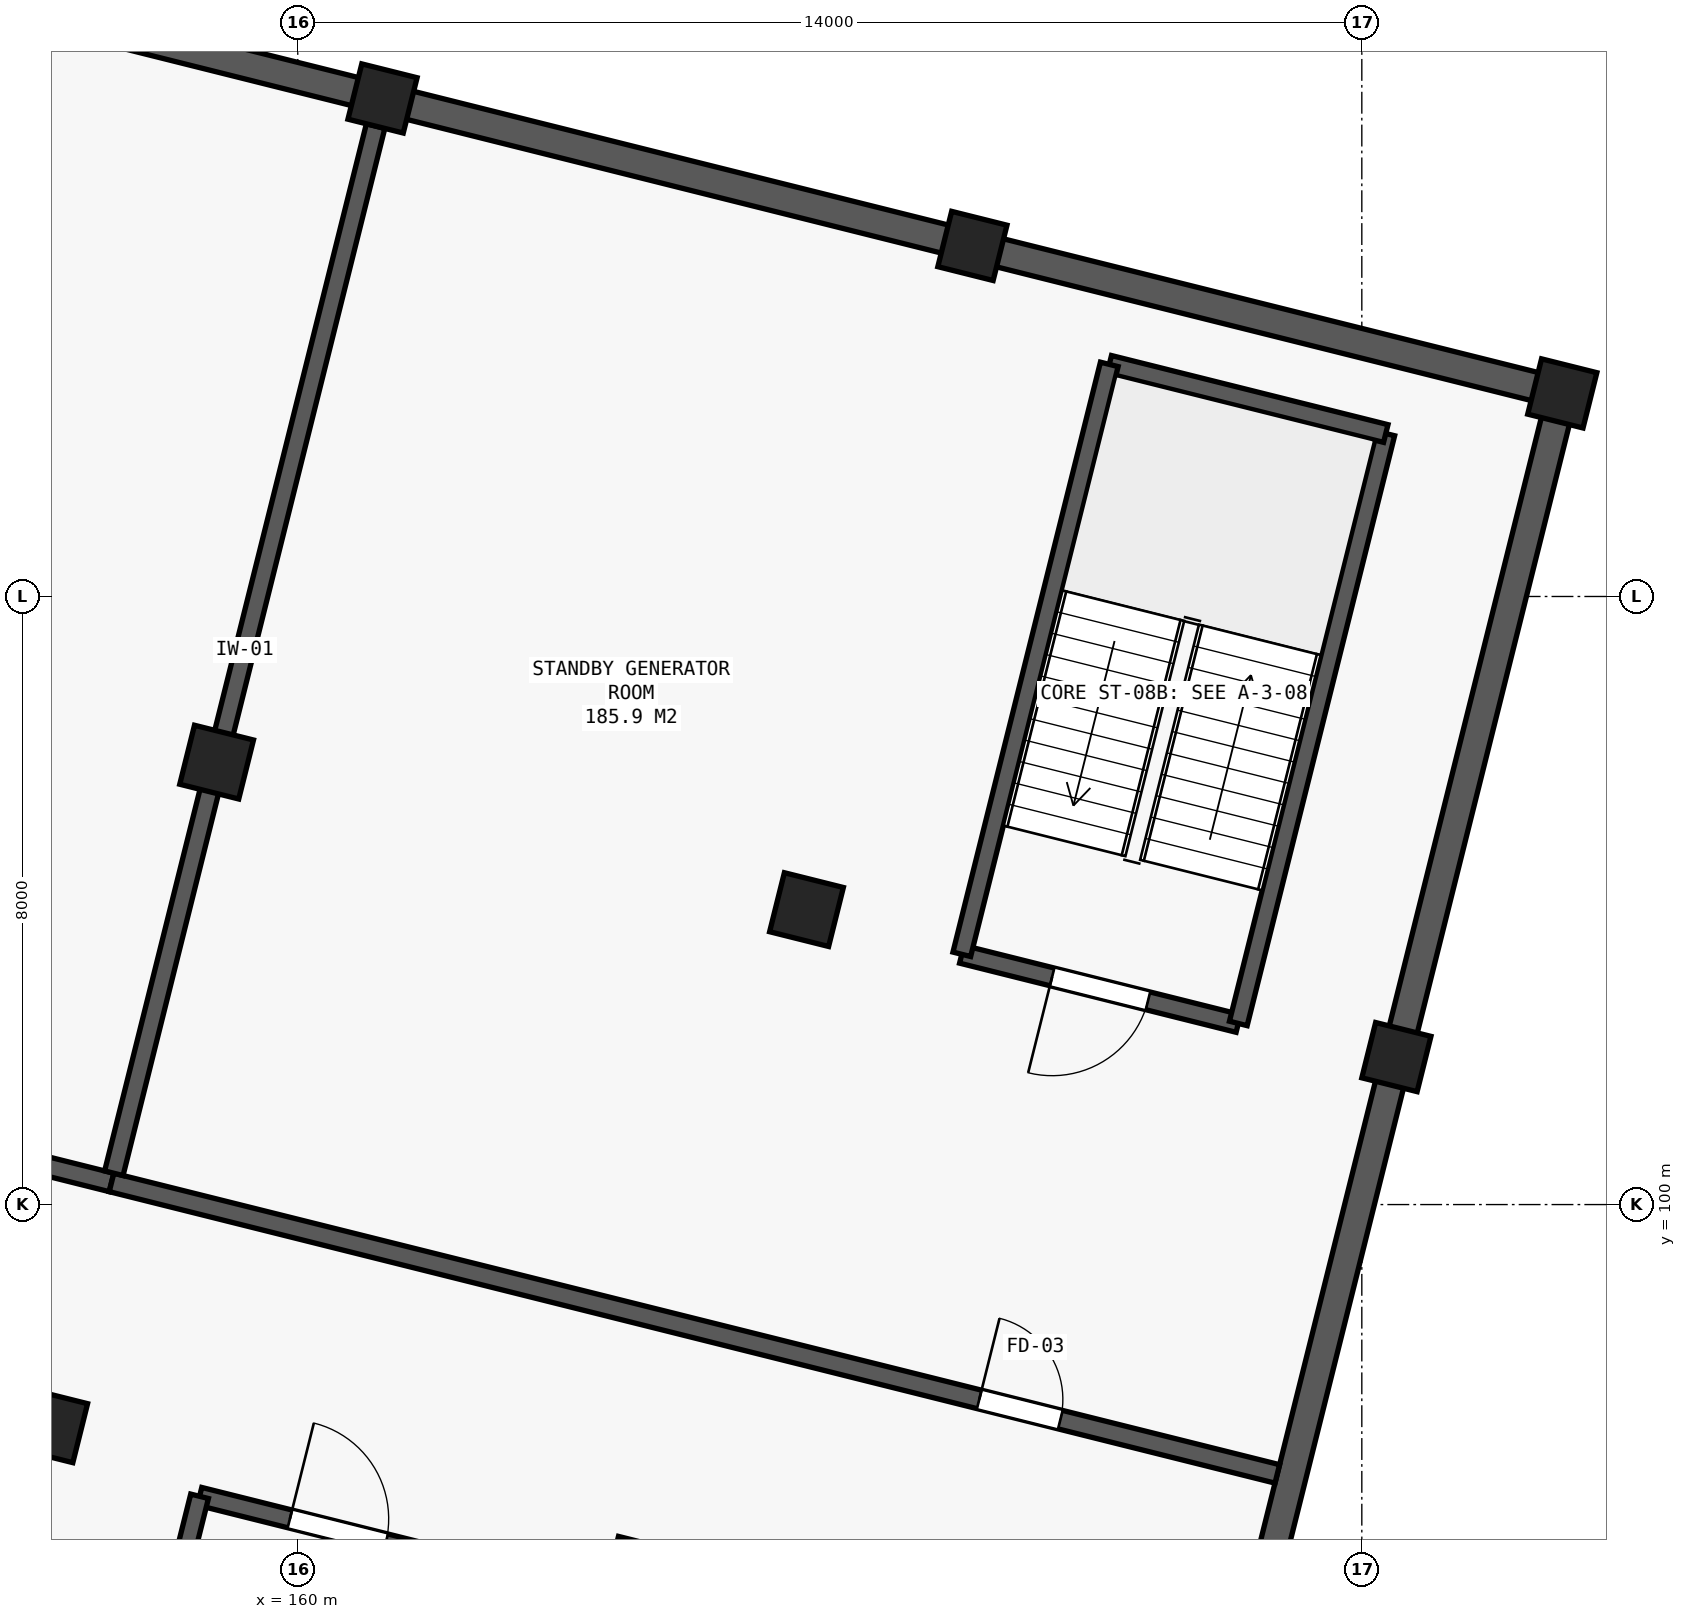
"""IFC4 building model, lengths in metres.
Left out: names, types, materials, properties, quantities, classifications, styles, units other than length and angle.
Written with IfcOpenShell. Run it as: python <this file> out.ifc"""

import sys

from ifc_helpers import new_model, si_unit, direction, frame, frame_2d, origin, origin_2d, place, context, subcontext, project, spatial, rectangle, extrude, element, fill, save


model = new_model("IFC4")
c1 = context("Model", 3, precision=1e-05, world=origin(), true_north=direction((0.0, 1.0)))
c2 = subcontext(c1, "Body", "Model", "MODEL_VIEW")
j1 = project(units=[si_unit("LENGTHUNIT", "METRE"), si_unit("PLANEANGLEUNIT", "RADIAN")], contexts=[c1])
p1 = place(None, origin())
s1 = spatial("IfcSite", under=j1, at=p1, CompositionType="ELEMENT")
p2 = place(p1, origin())
s2 = spatial("IfcBuilding", under=s1, at=p2, CompositionType="ELEMENT")
p3 = place(p2, frame((0.0, 0.0, -4.2)))
s3 = spatial("IfcBuildingStorey", under=s2, at=p3, CompositionType="ELEMENT", Elevation=-4.2)
for number, where, z_axis, x_axis in (
    (1, (156.75, 97.09, -0.4), (0.0, 0.0, 1.0), (0.97, -0.243, 0.0)),
    (2, (158.932, 105.821, -0.4), (0.0, 0.0, 1.0), (0.97, -0.243, 0.0)),
):
    element("IfcColumn", number, at=place(p3, frame(where, z_axis=z_axis, x_axis=x_axis)), inside=s3, PredefinedType="COLUMN", context=c2, shape_type="SweptSolid", body=[
        extrude(rectangle(XDim=0.8, YDim=0.8, at=origin_2d()), origin(), (0.0, 0.0, 1.0), 4.6),
    ])
p4 = place(p3, frame((161.115, 114.552, -0.4), z_axis=(0.0, 0.0, 1.0), x_axis=(0.970142500145, -0.242535625038, 0.0)))
e3 = element("IfcColumn", 3, at=p4, inside=s3, PredefinedType="COLUMN", context=c2, shape_type="SweptSolid", body=[
    extrude(rectangle(XDim=0.75, YDim=0.75, at=origin_2d()), origin(), (0.0, 0.0, 1.0), 4.6),
])
for number, where, z_axis, x_axis in (
    (4, (164.511, 95.149, -0.4), (0.0, 0.0, 1.0), (0.97, -0.243, 0.0)),
    (5, (166.694, 103.881, -0.4), (0.0, 0.0, 1.0), (0.97, -0.243, 0.0)),
):
    element("IfcColumn", number, at=place(p3, frame(where, z_axis=z_axis, x_axis=x_axis)), inside=s3, PredefinedType="COLUMN", context=c2, shape_type="SweptSolid", body=[
        extrude(rectangle(XDim=0.8, YDim=0.8, at=origin_2d()), origin(), (0.0, 0.0, 1.0), 4.6),
    ])
for number, where, z_axis, x_axis in (
    (6, (168.876, 112.612, -0.4), (0.0, 0.0, 1.0), (0.97, -0.243, 0.0)),
    (7, (174.455, 101.94, -0.4), (0.0, 0.0, 1.0), (0.97, -0.243, 0.0)),
    (8, (176.638, 110.672, -0.4), (0.0, 0.0, 1.0), (0.97, -0.243, 0.0)),
):
    element("IfcColumn", number, at=place(p3, frame(where, z_axis=z_axis, x_axis=x_axis)), inside=s3, PredefinedType="COLUMN", context=c2, shape_type="SweptSolid", body=[
        extrude(rectangle(XDim=0.75, YDim=0.75, at=origin_2d()), origin(), (0.0, 0.0, 1.0), 4.6),
    ])
p5 = place(p3, frame((153.354, 116.492, 0.0), z_axis=(0.0, 0.0, 1.0), x_axis=(0.970144295309, -0.242528444268, 0.0)))
e9 = element("IfcWall", 9, at=p5, inside=s3, PredefinedType="SOLIDWALL", context=c2, shape_type="SweptSolid", body=[
    extrude(rectangle(XDim=8.0, YDim=0.38, at=frame_2d((4.0, 0.0))), origin(), (0.0, 0.0, 1.0), 3.9),
])
p6 = place(p3, frame((161.115, 114.552, 0.0), z_axis=(0.0, 0.0, 1.0), x_axis=(0.970138909791, -0.242549986002, 0.0)))
e10 = element("IfcWall", 10, at=p6, inside=s3, PredefinedType="SOLIDWALL", context=c2, shape_type="SweptSolid", body=[
    extrude(rectangle(XDim=8.0, YDim=0.38, at=frame_2d((4.0, 0.0))), origin(), (0.0, 0.0, 1.0), 3.9),
])
p7 = place(p3, frame((168.876, 112.612, 0.0), z_axis=(0.0, 0.0, 1.0), x_axis=(0.970146090314, -0.242521263911, 0.0)))
e11 = element("IfcWall", 11, at=p7, inside=s3, PredefinedType="SOLIDWALL", context=c2, shape_type="SweptSolid", body=[
    extrude(rectangle(XDim=8.0, YDim=0.38, at=frame_2d((4.0, 0.0))), origin(), (0.0, 0.0, 1.0), 3.9),
])
p8 = place(p3, frame((174.455, 101.94, 0.0), z_axis=(0.0, 0.0, 1.0), x_axis=(-0.242542007841, -0.970140904422, 0.0)))
e12 = element("IfcWall", 12, at=p8, inside=s3, PredefinedType="SOLIDWALL", context=c2, shape_type="SweptSolid", body=[
    extrude(rectangle(XDim=9.0, YDim=0.38, at=frame_2d((4.5, 0.0))), origin(), (0.0, 0.0, 1.0), 3.9),
])
p9 = place(p3, frame((176.638, 110.672, 0.0), z_axis=(0.0, 0.0, 1.0), x_axis=(-0.242535625036, -0.970142500145, 0.0)))
e13 = element("IfcWall", 13, at=p9, inside=s3, PredefinedType="SOLIDWALL", context=c2, shape_type="SweptSolid", body=[
    extrude(rectangle(XDim=9.0, YDim=0.38, at=frame_2d((4.5, 0.0))), origin(), (0.0, 0.0, 1.0), 3.9),
])
p10 = place(p3, frame((158.708, 96.162, 0.0), z_axis=(0.0, 0.0, 1.0), x_axis=(0.970150158722, -0.242504988675, 0.0)))
e14 = element("IfcWall", 14, at=p10, inside=s3, PredefinedType="SOLIDWALL", context=c2, shape_type="SweptSolid", body=[
    extrude(rectangle(XDim=3.75, YDim=0.24, at=frame_2d((1.875, 0.0))), origin(), (0.0, 0.0, 1.0), 3.9),
])
p11 = place(p10, frame((1.225, 0.0, 0.0)))
e15 = element("IfcOpeningElement", 15, at=p11, cuts=e14, PredefinedType="OPENING", context=c2, shape_type="SweptSolid", body=[
    extrude(rectangle(XDim=1.3, YDim=2.15, at=frame_2d((0.65, 1.075))), frame((0.0, 0.13, 0.0), z_axis=(0.0, -1.0, 0.0), x_axis=(1.0, 0.0, 0.0)), (0.0, 0.0, 1.0), 0.26),
])
p12 = place(p3, frame((156.768, 88.401, 0.0), z_axis=(0.0, 0.0, 1.0), x_axis=(0.242521263911, 0.970146090314, 0.0)))
e16 = element("IfcWall", 16, at=p12, inside=s3, PredefinedType="SOLIDWALL", context=c2, shape_type="SweptSolid", body=[
    extrude(rectangle(XDim=8.0, YDim=0.24, at=frame_2d((4.0, 0.0))), origin(), (0.0, 0.0, 1.0), 3.9),
])
p13 = place(p3, frame((172.375, 102.383, 0.0), z_axis=(0.0, 0.0, 1.0), x_axis=(-0.970131009923, 0.242581581301, 0.0)))
e17 = element("IfcWall", 17, at=p13, inside=s3, PredefinedType="SOLIDWALL", context=c2, shape_type="SweptSolid", body=[
    extrude(rectangle(XDim=3.75, YDim=0.24, at=frame_2d((1.875, 0.0))), origin(), (0.0, 0.0, 1.0), 3.9),
])
p14 = place(p13, frame((1.225, 0.0, 0.0)))
e18 = element("IfcOpeningElement", 18, at=p14, cuts=e17, PredefinedType="OPENING", context=c2, shape_type="SweptSolid", body=[
    extrude(rectangle(XDim=1.3, YDim=2.15, at=frame_2d((0.65, 1.075))), frame((0.0, 0.13, 0.0), z_axis=(0.0, -1.0, 0.0), x_axis=(1.0, 0.0, 0.0)), (0.0, 0.0, 1.0), 0.26),
])
p15 = place(p3, frame((174.315, 110.144, 0.0), z_axis=(0.0, 0.0, 1.0), x_axis=(-0.242521263911, -0.970146090314, 0.0)))
e19 = element("IfcWall", 19, at=p15, inside=s3, PredefinedType="SOLIDWALL", context=c2, shape_type="SweptSolid", body=[
    extrude(rectangle(XDim=8.0, YDim=0.24, at=frame_2d((4.0, 0.0))), origin(), (0.0, 0.0, 1.0), 3.9),
])
p16 = place(p3, frame((170.677, 111.054, 0.0), z_axis=(0.0, 0.0, 1.0), x_axis=(0.970131009923, -0.242581581301, 0.0)))
e20 = element("IfcWall", 20, at=p16, inside=s3, PredefinedType="SOLIDWALL", context=c2, shape_type="SweptSolid", body=[
    extrude(rectangle(XDim=3.75, YDim=0.24, at=frame_2d((1.875, 0.0))), origin(), (0.0, 0.0, 1.0), 3.9),
])
p17 = place(p3, frame((168.737, 103.292, 0.0), z_axis=(0.0, 0.0, 1.0), x_axis=(0.242521263911, 0.970146090314, 0.0)))
e21 = element("IfcWall", 21, at=p17, inside=s3, PredefinedType="SOLIDWALL", context=c2, shape_type="SweptSolid", body=[
    extrude(rectangle(XDim=8.0, YDim=0.24, at=frame_2d((4.0, 0.0))), origin(), (0.0, 0.0, 1.0), 3.9),
])
p18 = place(p3, frame((142.028, 104.172, 0.0), z_axis=(0.0, 0.0, 1.0), x_axis=(0.97014160256, -0.242539215349, 0.0)))
e22 = element("IfcWall", 22, at=p18, inside=s3, PredefinedType="SOLIDWALL", context=c2, shape_type="SweptSolid", body=[
    extrude(rectangle(XDim=16.0, YDim=0.25, at=frame_2d((8.0, 0.0))), origin(), (0.0, 0.0, 1.0), 3.8),
])
p19 = place(p18, frame((3.874, 0.0, 0.0)))
e23 = element("IfcOpeningElement", 23, at=p19, cuts=e22, PredefinedType="OPENING", context=c2, shape_type="SweptSolid", body=[
    extrude(rectangle(XDim=1.1, YDim=2.15, at=frame_2d((0.55, 1.075))), frame((0.0, 0.135, 0.0), z_axis=(0.0, -1.0, 0.0), x_axis=(1.0, 0.0, 0.0)), (0.0, 0.0, 1.0), 0.27),
])
p20 = place(p3, frame((157.55, 100.291, 0.0), z_axis=(0.0, 0.0, 1.0), x_axis=(0.970142500145, -0.242535625036, 0.0)))
e24 = element("IfcWall", 24, at=p20, inside=s3, PredefinedType="SOLIDWALL", context=c2, shape_type="SweptSolid", body=[
    extrude(rectangle(XDim=15.81, YDim=0.25, at=frame_2d((7.905, 0.0))), origin(), (0.0, 0.0, 1.0), 3.8),
])
p21 = place(p20, frame((11.768, 0.0, 0.0)))
e25 = element("IfcOpeningElement", 25, at=p21, cuts=e24, PredefinedType="OPENING", context=c2, shape_type="SweptSolid", body=[
    extrude(rectangle(XDim=1.1, YDim=2.15, at=frame_2d((0.55, 1.075))), frame((0.0, 0.135, 0.0), z_axis=(0.0, -1.0, 0.0), x_axis=(1.0, 0.0, 0.0)), (0.0, 0.0, 1.0), 0.27),
])
p22 = place(p3, frame((157.58, 100.412, 0.0), z_axis=(0.0, 0.0, 1.0), x_axis=(0.24254371592, 0.970140477388, 0.0)))
e26 = element("IfcWall", 26, at=p22, inside=s3, PredefinedType="SOLIDWALL", context=c2, shape_type="SweptSolid", body=[
    extrude(rectangle(XDim=14.2, YDim=0.25, at=frame_2d((7.1, 0.0))), origin(), (0.0, 0.0, 1.0), 3.8),
])
p23 = place(p11, origin())
e27 = element("IfcDoor", 27, at=p23, inside=s3, OperationType="SINGLE_SWING_LEFT", PredefinedType="DOOR", context=c2, shape_type="SweptSolid", body=[
    extrude(rectangle(XDim=1.3, YDim=2.15, at=frame_2d((0.65, 1.075))), frame((0.0, 0.025, 0.0), z_axis=(0.0, -1.0, 0.0), x_axis=(1.0, 0.0, 0.0)), (0.0, 0.0, 1.0), 0.05),
])
fill(e15, e27)
p24 = place(p14, origin())
e28 = element("IfcDoor", 28, at=p24, inside=s3, OperationType="SINGLE_SWING_RIGHT", PredefinedType="DOOR", context=c2, shape_type="SweptSolid", body=[
    extrude(rectangle(XDim=1.3, YDim=2.15, at=frame_2d((0.65, 1.075))), frame((0.0, 0.025, 0.0), z_axis=(0.0, -1.0, 0.0), x_axis=(1.0, 0.0, 0.0)), (0.0, 0.0, 1.0), 0.05),
])
fill(e18, e28)
p25 = place(p21, origin())
e29 = element("IfcDoor", 29, at=p25, inside=s3, OperationType="SINGLE_SWING_LEFT", PredefinedType="DOOR", context=c2, shape_type="SweptSolid", body=[
    extrude(rectangle(XDim=1.1, YDim=2.15, at=frame_2d((0.55, 1.075))), frame((0.0, 0.025, 0.0), z_axis=(0.0, -1.0, 0.0), x_axis=(1.0, 0.0, 0.0)), (0.0, 0.0, 1.0), 0.05),
])
fill(e25, e29)
save(model, sys.argv[1])
